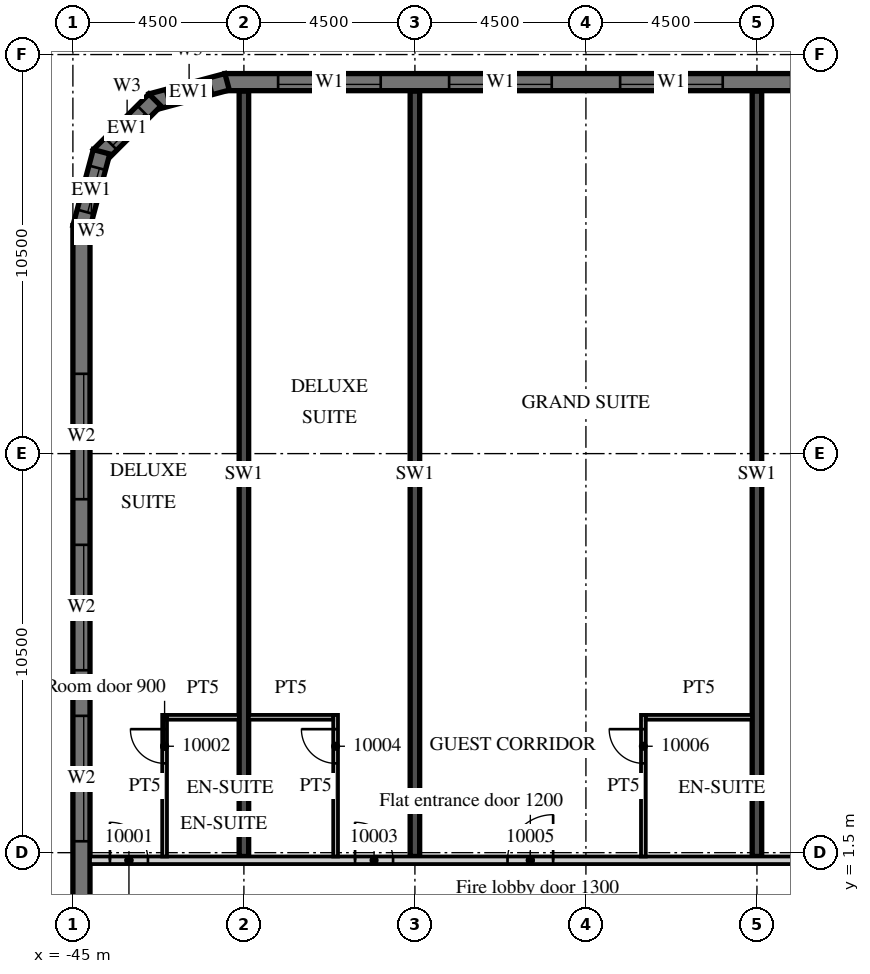
"""IFC4 building model, lengths in metres.
Left out: names, types, materials, properties, quantities, classifications, styles, units other than length and angle.
Written with IfcOpenShell. Run it as: python <this file> out.ifc"""

import sys

from ifc_helpers import new_model, si_unit, direction, frame, frame_2d, origin, place, context, subcontext, project, spatial, polyline, rectangle, outline, extrude, element, fill, save


model = new_model("IFC4")
c1 = context("Model", 3, precision=1e-05, world=origin(), true_north=direction((0.0, 1.0)))
c2 = subcontext(c1, "Body", "Model", "MODEL_VIEW")
j1 = project(units=[si_unit("LENGTHUNIT", "METRE"), si_unit("PLANEANGLEUNIT", "RADIAN")], contexts=[c1])
p1 = place(None, origin())
s1 = spatial("IfcSite", under=j1, at=p1, CompositionType="ELEMENT")
p2 = place(p1, origin())
s2 = spatial("IfcBuilding", under=s1, at=p2, CompositionType="ELEMENT")
p3 = place(p2, frame((0.0, 0.0, 63.3)))
s3 = spatial("IfcBuildingStorey", under=s2, at=p3, CompositionType="ELEMENT", Elevation=63.3)
for number, where, z_axis, x_axis in (
    (1, (-40.5, 1.4, 0.0), (0.0, 0.0, 1.0), (0.0, 1.0, 0.0)),
    (2, (-36.0, 1.4, 0.0), (0.0, 0.0, 1.0), (0.0, 1.0, 0.0)),
    (3, (-27.0, 1.4, 0.0), (0.0, 0.0, 1.0), (0.0, 1.0, 0.0)),
):
    element("IfcWall", number, at=place(p3, frame(where, z_axis=z_axis, x_axis=x_axis)), inside=s3, PredefinedType="SHEAR", context=c2, shape_type="SweptSolid", body=[
        extrude(rectangle(XDim=20.14, YDim=0.25, at=frame_2d((10.07, 0.0))), origin(), (0.0, 0.0, 1.0), 3.3),
    ])
p4 = place(p3, frame((13.5, 21.775, 0.0), z_axis=(0.0, 0.0, 1.0), x_axis=(-1.0, 0.0, 0.0)))
e4 = element("IfcWall", 4, at=p4, inside=s3, PredefinedType="SOLIDWALL", context=c2, shape_type="SweptSolid", body=[
    extrude(rectangle(XDim=54.5, YDim=0.45, at=frame_2d((27.25, 0.0))), origin(), (0.0, 0.0, 1.0), 3.02),
])
p5 = place(p4, frame((0.9, 0.0, 0.45)))
e5 = element("IfcOpeningElement", 5, at=p5, cuts=e4, PredefinedType="OPENING", context=c2, shape_type="SweptSolid", body=[
    extrude(rectangle(XDim=2.7, YDim=2.25, at=frame_2d((1.35, 1.125))), frame((0.0, 0.235, 0.0), z_axis=(0.0, -1.0, 0.0), x_axis=(1.0, 0.0, 0.0)), (0.0, 0.0, 1.0), 0.47),
])
p6 = place(p4, frame((5.4, 0.0, 0.45)))
e6 = element("IfcOpeningElement", 6, at=p6, cuts=e4, PredefinedType="OPENING", context=c2, shape_type="SweptSolid", body=[
    extrude(rectangle(XDim=2.7, YDim=2.25, at=frame_2d((1.35, 1.125))), frame((0.0, 0.235, 0.0), z_axis=(0.0, -1.0, 0.0), x_axis=(1.0, 0.0, 0.0)), (0.0, 0.0, 1.0), 0.47),
])
p7 = place(p4, frame((9.9, 0.0, 0.45)))
e7 = element("IfcOpeningElement", 7, at=p7, cuts=e4, PredefinedType="OPENING", context=c2, shape_type="SweptSolid", body=[
    extrude(rectangle(XDim=2.7, YDim=2.25, at=frame_2d((1.35, 1.125))), frame((0.0, 0.235, 0.0), z_axis=(0.0, -1.0, 0.0), x_axis=(1.0, 0.0, 0.0)), (0.0, 0.0, 1.0), 0.47),
])
p8 = place(p4, frame((14.4, 0.0, 0.45)))
e8 = element("IfcOpeningElement", 8, at=p8, cuts=e4, PredefinedType="OPENING", context=c2, shape_type="SweptSolid", body=[
    extrude(rectangle(XDim=2.7, YDim=2.25, at=frame_2d((1.35, 1.125))), frame((0.0, 0.235, 0.0), z_axis=(0.0, -1.0, 0.0), x_axis=(1.0, 0.0, 0.0)), (0.0, 0.0, 1.0), 0.47),
])
p9 = place(p4, frame((18.9, 0.0, 0.45)))
e9 = element("IfcOpeningElement", 9, at=p9, cuts=e4, PredefinedType="OPENING", context=c2, shape_type="SweptSolid", body=[
    extrude(rectangle(XDim=2.7, YDim=2.25, at=frame_2d((1.35, 1.125))), frame((0.0, 0.235, 0.0), z_axis=(0.0, -1.0, 0.0), x_axis=(1.0, 0.0, 0.0)), (0.0, 0.0, 1.0), 0.47),
])
p10 = place(p4, frame((23.4, 0.0, 0.45)))
e10 = element("IfcOpeningElement", 10, at=p10, cuts=e4, PredefinedType="OPENING", context=c2, shape_type="SweptSolid", body=[
    extrude(rectangle(XDim=2.7, YDim=2.25, at=frame_2d((1.35, 1.125))), frame((0.0, 0.235, 0.0), z_axis=(0.0, -1.0, 0.0), x_axis=(1.0, 0.0, 0.0)), (0.0, 0.0, 1.0), 0.47),
])
p11 = place(p4, frame((27.9, 0.0, 0.45)))
e11 = element("IfcOpeningElement", 11, at=p11, cuts=e4, PredefinedType="OPENING", context=c2, shape_type="SweptSolid", body=[
    extrude(rectangle(XDim=2.7, YDim=2.25, at=frame_2d((1.35, 1.125))), frame((0.0, 0.235, 0.0), z_axis=(0.0, -1.0, 0.0), x_axis=(1.0, 0.0, 0.0)), (0.0, 0.0, 1.0), 0.47),
])
p12 = place(p4, frame((32.4, 0.0, 0.45)))
e12 = element("IfcOpeningElement", 12, at=p12, cuts=e4, PredefinedType="OPENING", context=c2, shape_type="SweptSolid", body=[
    extrude(rectangle(XDim=2.7, YDim=2.25, at=frame_2d((1.35, 1.125))), frame((0.0, 0.235, 0.0), z_axis=(0.0, -1.0, 0.0), x_axis=(1.0, 0.0, 0.0)), (0.0, 0.0, 1.0), 0.47),
])
p13 = place(p4, frame((36.9, 0.0, 0.45)))
e13 = element("IfcOpeningElement", 13, at=p13, cuts=e4, PredefinedType="OPENING", context=c2, shape_type="SweptSolid", body=[
    extrude(rectangle(XDim=2.7, YDim=2.25, at=frame_2d((1.35, 1.125))), frame((0.0, 0.235, 0.0), z_axis=(0.0, -1.0, 0.0), x_axis=(1.0, 0.0, 0.0)), (0.0, 0.0, 1.0), 0.47),
])
p14 = place(p4, frame((41.4, 0.0, 0.45)))
e14 = element("IfcOpeningElement", 14, at=p14, cuts=e4, PredefinedType="OPENING", context=c2, shape_type="SweptSolid", body=[
    extrude(rectangle(XDim=2.7, YDim=2.25, at=frame_2d((1.35, 1.125))), frame((0.0, 0.235, 0.0), z_axis=(0.0, -1.0, 0.0), x_axis=(1.0, 0.0, 0.0)), (0.0, 0.0, 1.0), 0.47),
])
p15 = place(p4, frame((45.9, 0.0, 0.45)))
e15 = element("IfcOpeningElement", 15, at=p15, cuts=e4, PredefinedType="OPENING", context=c2, shape_type="SweptSolid", body=[
    extrude(rectangle(XDim=2.7, YDim=2.25, at=frame_2d((1.35, 1.125))), frame((0.0, 0.235, 0.0), z_axis=(0.0, -1.0, 0.0), x_axis=(1.0, 0.0, 0.0)), (0.0, 0.0, 1.0), 0.47),
])
p16 = place(p4, frame((50.4, 0.0, 0.45)))
e16 = element("IfcOpeningElement", 16, at=p16, cuts=e4, PredefinedType="OPENING", context=c2, shape_type="SweptSolid", body=[
    extrude(rectangle(XDim=2.7, YDim=2.25, at=frame_2d((1.35, 1.125))), frame((0.0, 0.235, 0.0), z_axis=(0.0, -1.0, 0.0), x_axis=(1.0, 0.0, 0.0)), (0.0, 0.0, 1.0), 0.47),
])
p17 = place(p3, frame((-40.942, 21.783, 0.0), z_axis=(0.0, 0.0, 1.0), x_axis=(-0.965926999034, -0.25881466832, 0.0)))
e17 = element("IfcWall", 17, at=p17, inside=s3, PredefinedType="SOLIDWALL", context=c2, shape_type="SweptSolid", body=[
    extrude(outline(polyline([(0.0, -0.225), (2.071, -0.225), (1.95, 0.225), (0.121, 0.225), (0.0, -0.225)])), origin(), (0.0, 0.0, 1.0), 3.02),
])
p18 = place(p17, frame((0.435, 0.0, 0.45)))
e18 = element("IfcOpeningElement", 18, at=p18, cuts=e17, PredefinedType="OPENING", context=c2, shape_type="SweptSolid", body=[
    extrude(rectangle(XDim=1.2, YDim=2.25, at=frame_2d((0.6, 1.125))), frame((0.0, 0.235, 0.0), z_axis=(0.0, -1.0, 0.0), x_axis=(1.0, 0.0, 0.0)), (0.0, 0.0, 1.0), 0.47),
])
p19 = place(p3, frame((-42.841, 21.305, 0.0), z_axis=(0.0, 0.0, 1.0), x_axis=(-0.707106781187, -0.707106781187, 0.0)))
e19 = element("IfcWall", 19, at=p19, inside=s3, PredefinedType="SOLIDWALL", context=c2, shape_type="SweptSolid", body=[
    extrude(outline(polyline([(0.0, -0.225), (2.071, -0.225), (1.95, 0.225), (0.121, 0.225), (0.0, -0.225)])), origin(), (0.0, 0.0, 1.0), 3.02),
])
p20 = place(p19, frame((0.435, 0.0, 0.45)))
e20 = element("IfcOpeningElement", 20, at=p20, cuts=e19, PredefinedType="OPENING", context=c2, shape_type="SweptSolid", body=[
    extrude(rectangle(XDim=1.2, YDim=2.25, at=frame_2d((0.6, 1.125))), frame((0.0, 0.235, 0.0), z_axis=(0.0, -1.0, 0.0), x_axis=(1.0, 0.0, 0.0)), (0.0, 0.0, 1.0), 0.47),
])
p21 = place(p3, frame((-44.247, 19.942, 0.0), z_axis=(0.0, 0.0, 1.0), x_axis=(-0.25881466832, -0.965926999034, 0.0)))
e21 = element("IfcWall", 21, at=p21, inside=s3, PredefinedType="SOLIDWALL", context=c2, shape_type="SweptSolid", body=[
    extrude(outline(polyline([(-0.0, -0.225), (2.07, -0.225), (1.95, 0.225), (0.12, 0.225), (-0.0, -0.225)])), origin(), (0.0, 0.0, 1.0), 3.02),
])
p22 = place(p21, frame((0.435, 0.0, 0.45)))
e22 = element("IfcOpeningElement", 22, at=p22, cuts=e21, PredefinedType="OPENING", context=c2, shape_type="SweptSolid", body=[
    extrude(rectangle(XDim=1.2, YDim=2.25, at=frame_2d((0.6, 1.125))), frame((0.0, 0.235, 0.0), z_axis=(0.0, -1.0, 0.0), x_axis=(1.0, 0.0, 0.0)), (0.0, 0.0, 1.0), 0.47),
])
p23 = place(p3, frame((-44.775, 18.0, 0.0), z_axis=(0.0, 0.0, 1.0), x_axis=(0.0, -1.0, 0.0)))
e23 = element("IfcWall", 23, at=p23, inside=s3, PredefinedType="SOLIDWALL", context=c2, shape_type="SweptSolid", body=[
    extrude(rectangle(XDim=36.0, YDim=0.45, at=frame_2d((18.0, 0.0))), origin(), (0.0, 0.0, 1.0), 3.02),
])
p24 = place(p23, frame((3.9, 0.0, 0.45)))
e24 = element("IfcOpeningElement", 24, at=p24, cuts=e23, PredefinedType="OPENING", context=c2, shape_type="SweptSolid", body=[
    extrude(rectangle(XDim=3.3, YDim=2.25, at=frame_2d((1.65, 1.125))), frame((0.0, 0.235, 0.0), z_axis=(0.0, -1.0, 0.0), x_axis=(1.0, 0.0, 0.0)), (0.0, 0.0, 1.0), 0.47),
])
p25 = place(p23, frame((8.4, 0.0, 0.45)))
e25 = element("IfcOpeningElement", 25, at=p25, cuts=e23, PredefinedType="OPENING", context=c2, shape_type="SweptSolid", body=[
    extrude(rectangle(XDim=3.3, YDim=2.25, at=frame_2d((1.65, 1.125))), frame((0.0, 0.235, 0.0), z_axis=(0.0, -1.0, 0.0), x_axis=(1.0, 0.0, 0.0)), (0.0, 0.0, 1.0), 0.47),
])
p26 = place(p23, frame((12.9, 0.0, 0.45)))
e26 = element("IfcOpeningElement", 26, at=p26, cuts=e23, PredefinedType="OPENING", context=c2, shape_type="SweptSolid", body=[
    extrude(rectangle(XDim=3.3, YDim=2.25, at=frame_2d((1.65, 1.125))), frame((0.0, 0.235, 0.0), z_axis=(0.0, -1.0, 0.0), x_axis=(1.0, 0.0, 0.0)), (0.0, 0.0, 1.0), 0.47),
])
p27 = place(p3, frame((-44.55, 1.3, 0.0), z_axis=(0.0, 0.0, 1.0), x_axis=(1.0, 0.0, 0.0)))
e27 = element("IfcWall", 27, at=p27, inside=s3, PredefinedType="PARTITIONING", context=c2, shape_type="SweptSolid", body=[
    extrude(rectangle(XDim=58.05, YDim=0.2, at=frame_2d((29.025, 0.0))), origin(), (0.0, 0.0, 1.0), 3.02),
])
p28 = place(p27, frame((0.525, 0.0, 0.0)))
e28 = element("IfcOpeningElement", 28, at=p28, cuts=e27, PredefinedType="OPENING", context=c2, shape_type="SweptSolid", body=[
    extrude(rectangle(XDim=1.0, YDim=2.1, at=frame_2d((0.5, 1.05))), frame((0.0, 0.11, 0.0), z_axis=(0.0, -1.0, 0.0), x_axis=(1.0, 0.0, 0.0)), (0.0, 0.0, 1.0), 0.22),
])
p29 = place(p27, frame((6.975, 0.0, 0.0)))
e29 = element("IfcOpeningElement", 29, at=p29, cuts=e27, PredefinedType="OPENING", context=c2, shape_type="SweptSolid", body=[
    extrude(rectangle(XDim=1.0, YDim=2.1, at=frame_2d((0.5, 1.05))), frame((0.0, 0.11, 0.0), z_axis=(0.0, -1.0, 0.0), x_axis=(1.0, 0.0, 0.0)), (0.0, 0.0, 1.0), 0.22),
])
p30 = place(p27, frame((10.987, 0.0, 0.0)))
e30 = element("IfcOpeningElement", 30, at=p30, cuts=e27, PredefinedType="OPENING", context=c2, shape_type="SweptSolid", body=[
    extrude(rectangle(XDim=1.2, YDim=2.1, at=frame_2d((0.6, 1.05))), frame((0.0, 0.11, 0.0), z_axis=(0.0, -1.0, 0.0), x_axis=(1.0, 0.0, 0.0)), (0.0, 0.0, 1.0), 0.22),
])
p31 = place(p27, frame((19.987, 0.0, 0.0)))
e31 = element("IfcOpeningElement", 31, at=p31, cuts=e27, PredefinedType="OPENING", context=c2, shape_type="SweptSolid", body=[
    extrude(rectangle(XDim=1.2, YDim=2.1, at=frame_2d((0.6, 1.05))), frame((0.0, 0.11, 0.0), z_axis=(0.0, -1.0, 0.0), x_axis=(1.0, 0.0, 0.0)), (0.0, 0.0, 1.0), 0.22),
])
p32 = place(p27, frame((29.5, 0.0, 0.0)))
e32 = element("IfcOpeningElement", 32, at=p32, cuts=e27, PredefinedType="OPENING", context=c2, shape_type="SweptSolid", body=[
    extrude(rectangle(XDim=1.0, YDim=2.1, at=frame_2d((0.5, 1.05))), frame((0.0, 0.11, 0.0), z_axis=(0.0, -1.0, 0.0), x_axis=(1.0, 0.0, 0.0)), (0.0, 0.0, 1.0), 0.22),
])
p33 = place(p27, frame((33.975, 0.0, 0.0)))
e33 = element("IfcOpeningElement", 33, at=p33, cuts=e27, PredefinedType="OPENING", context=c2, shape_type="SweptSolid", body=[
    extrude(rectangle(XDim=1.0, YDim=2.1, at=frame_2d((0.5, 1.05))), frame((0.0, 0.11, 0.0), z_axis=(0.0, -1.0, 0.0), x_axis=(1.0, 0.0, 0.0)), (0.0, 0.0, 1.0), 0.22),
])
p34 = place(p27, frame((40.912, 0.0, 0.0)))
e34 = element("IfcOpeningElement", 34, at=p34, cuts=e27, PredefinedType="OPENING", context=c2, shape_type="SweptSolid", body=[
    extrude(rectangle(XDim=1.2, YDim=2.1, at=frame_2d((0.6, 1.05))), frame((0.0, 0.11, 0.0), z_axis=(0.0, -1.0, 0.0), x_axis=(1.0, 0.0, 0.0)), (0.0, 0.0, 1.0), 0.22),
])
p35 = place(p27, frame((47.5, 0.0, 0.0)))
e35 = element("IfcOpeningElement", 35, at=p35, cuts=e27, PredefinedType="OPENING", context=c2, shape_type="SweptSolid", body=[
    extrude(rectangle(XDim=1.0, YDim=2.1, at=frame_2d((0.5, 1.05))), frame((0.0, 0.11, 0.0), z_axis=(0.0, -1.0, 0.0), x_axis=(1.0, 0.0, 0.0)), (0.0, 0.0, 1.0), 0.22),
])
p36 = place(p27, frame((51.975, 0.0, 0.0)))
e36 = element("IfcOpeningElement", 36, at=p36, cuts=e27, PredefinedType="OPENING", context=c2, shape_type="SweptSolid", body=[
    extrude(rectangle(XDim=1.0, YDim=2.1, at=frame_2d((0.5, 1.05))), frame((0.0, 0.11, 0.0), z_axis=(0.0, -1.0, 0.0), x_axis=(1.0, 0.0, 0.0)), (0.0, 0.0, 1.0), 0.22),
])
p37 = place(p27, frame((56.475, 0.0, 0.0)))
e37 = element("IfcOpeningElement", 37, at=p37, cuts=e27, PredefinedType="OPENING", context=c2, shape_type="SweptSolid", body=[
    extrude(rectangle(XDim=1.0, YDim=2.1, at=frame_2d((0.5, 1.05))), frame((0.0, 0.11, 0.0), z_axis=(0.0, -1.0, 0.0), x_axis=(1.0, 0.0, 0.0)), (0.0, 0.0, 1.0), 0.22),
])
p38 = place(p3, frame((-42.587, 1.4, 0.0), z_axis=(0.0, 0.0, 1.0), x_axis=(0.0, 1.0, 0.0)))
e38 = element("IfcWall", 38, at=p38, inside=s3, PredefinedType="PARTITIONING", context=c2, shape_type="SweptSolid", body=[
    extrude(rectangle(XDim=3.725, YDim=0.125, at=frame_2d((1.863, 0.0))), origin(), (0.0, 0.0, 1.0), 3.02),
])
p39 = place(p38, frame((2.45, 0.0, 0.0)))
e39 = element("IfcOpeningElement", 39, at=p39, cuts=e38, PredefinedType="OPENING", context=c2, shape_type="SweptSolid", body=[
    extrude(rectangle(XDim=0.9, YDim=2.1, at=frame_2d((0.45, 1.05))), frame((0.0, 0.073, 0.0), z_axis=(0.0, -1.0, 0.0), x_axis=(1.0, 0.0, 0.0)), (0.0, 0.0, 1.0), 0.145),
])
p40 = place(p3, frame((-42.525, 5.062, 0.0), z_axis=(0.0, 0.0, 1.0), x_axis=(1.0, 0.0, 0.0)))
e40 = element("IfcWall", 40, at=p40, inside=s3, PredefinedType="PARTITIONING", context=c2, shape_type="SweptSolid", body=[
    extrude(rectangle(XDim=1.9, YDim=0.125, at=frame_2d((0.95, 0.0))), origin(), (0.0, 0.0, 1.0), 3.02),
])
p41 = place(p3, frame((-38.087, 1.4, 0.0), z_axis=(0.0, 0.0, 1.0), x_axis=(0.0, 1.0, 0.0)))
e41 = element("IfcWall", 41, at=p41, inside=s3, PredefinedType="PARTITIONING", context=c2, shape_type="SweptSolid", body=[
    extrude(rectangle(XDim=3.725, YDim=0.125, at=frame_2d((1.863, 0.0))), origin(), (0.0, 0.0, 1.0), 3.02),
])
p42 = place(p41, frame((2.45, 0.0, 0.0)))
e42 = element("IfcOpeningElement", 42, at=p42, cuts=e41, PredefinedType="OPENING", context=c2, shape_type="SweptSolid", body=[
    extrude(rectangle(XDim=0.9, YDim=2.1, at=frame_2d((0.45, 1.05))), frame((0.0, 0.073, 0.0), z_axis=(0.0, -1.0, 0.0), x_axis=(1.0, 0.0, 0.0)), (0.0, 0.0, 1.0), 0.145),
])
p43 = place(p3, frame((-40.375, 5.062, 0.0), z_axis=(0.0, 0.0, 1.0), x_axis=(1.0, 0.0, 0.0)))
e43 = element("IfcWall", 43, at=p43, inside=s3, PredefinedType="PARTITIONING", context=c2, shape_type="SweptSolid", body=[
    extrude(rectangle(XDim=2.225, YDim=0.125, at=frame_2d((1.113, 0.0))), origin(), (0.0, 0.0, 1.0), 3.02),
])
p44 = place(p3, frame((-29.988, 1.4, 0.0), z_axis=(0.0, 0.0, 1.0), x_axis=(0.0, 1.0, 0.0)))
e44 = element("IfcWall", 44, at=p44, inside=s3, PredefinedType="PARTITIONING", context=c2, shape_type="SweptSolid", body=[
    extrude(rectangle(XDim=3.725, YDim=0.125, at=frame_2d((1.863, 0.0))), origin(), (0.0, 0.0, 1.0), 3.02),
])
p45 = place(p44, frame((2.45, 0.0, 0.0)))
e45 = element("IfcOpeningElement", 45, at=p45, cuts=e44, PredefinedType="OPENING", context=c2, shape_type="SweptSolid", body=[
    extrude(rectangle(XDim=0.9, YDim=2.1, at=frame_2d((0.45, 1.05))), frame((0.0, 0.073, 0.0), z_axis=(0.0, -1.0, 0.0), x_axis=(1.0, 0.0, 0.0)), (0.0, 0.0, 1.0), 0.145),
])
p46 = place(p3, frame((-29.925, 5.062, 0.0), z_axis=(0.0, 0.0, 1.0), x_axis=(1.0, 0.0, 0.0)))
e46 = element("IfcWall", 46, at=p46, inside=s3, PredefinedType="PARTITIONING", context=c2, shape_type="SweptSolid", body=[
    extrude(rectangle(XDim=2.8, YDim=0.125, at=frame_2d((1.4, 0.0))), origin(), (0.0, 0.0, 1.0), 3.02),
])
p47 = place(p14, origin())
e47 = element("IfcWindow", 47, at=p47, inside=s3, PartitioningType="SINGLE_PANEL", PredefinedType="WINDOW", context=c2, shape_type="SweptSolid", body=[
    extrude(rectangle(XDim=2.7, YDim=2.25, at=frame_2d((1.35, 1.125))), frame((0.0, 0.09, 0.0), z_axis=(0.0, -1.0, 0.0), x_axis=(1.0, 0.0, 0.0)), (0.0, 0.0, 1.0), 0.06),
])
fill(e14, e47)
p48 = place(p15, origin())
e48 = element("IfcWindow", 48, at=p48, inside=s3, PartitioningType="SINGLE_PANEL", PredefinedType="WINDOW", context=c2, shape_type="SweptSolid", body=[
    extrude(rectangle(XDim=2.7, YDim=2.25, at=frame_2d((1.35, 1.125))), frame((0.0, 0.09, 0.0), z_axis=(0.0, -1.0, 0.0), x_axis=(1.0, 0.0, 0.0)), (0.0, 0.0, 1.0), 0.06),
])
fill(e15, e48)
p49 = place(p16, origin())
e49 = element("IfcWindow", 49, at=p49, inside=s3, PartitioningType="SINGLE_PANEL", PredefinedType="WINDOW", context=c2, shape_type="SweptSolid", body=[
    extrude(rectangle(XDim=2.7, YDim=2.25, at=frame_2d((1.35, 1.125))), frame((0.0, 0.09, 0.0), z_axis=(0.0, -1.0, 0.0), x_axis=(1.0, 0.0, 0.0)), (0.0, 0.0, 1.0), 0.06),
])
fill(e16, e49)
p50 = place(p18, origin())
e50 = element("IfcWindow", 50, at=p50, inside=s3, PartitioningType="SINGLE_PANEL", PredefinedType="WINDOW", context=c2, shape_type="SweptSolid", body=[
    extrude(rectangle(XDim=1.2, YDim=2.25, at=frame_2d((0.6, 1.125))), frame((0.0, 0.09, 0.0), z_axis=(0.0, -1.0, 0.0), x_axis=(1.0, 0.0, 0.0)), (0.0, 0.0, 1.0), 0.06),
])
fill(e18, e50)
p51 = place(p20, origin())
e51 = element("IfcWindow", 51, at=p51, inside=s3, PartitioningType="SINGLE_PANEL", PredefinedType="WINDOW", context=c2, shape_type="SweptSolid", body=[
    extrude(rectangle(XDim=1.2, YDim=2.25, at=frame_2d((0.6, 1.125))), frame((0.0, 0.09, 0.0), z_axis=(0.0, -1.0, 0.0), x_axis=(1.0, 0.0, 0.0)), (0.0, 0.0, 1.0), 0.06),
])
fill(e20, e51)
p52 = place(p22, origin())
e52 = element("IfcWindow", 52, at=p52, inside=s3, PartitioningType="SINGLE_PANEL", PredefinedType="WINDOW", context=c2, shape_type="SweptSolid", body=[
    extrude(rectangle(XDim=1.2, YDim=2.25, at=frame_2d((0.6, 1.125))), frame((0.0, 0.09, 0.0), z_axis=(0.0, -1.0, 0.0), x_axis=(1.0, 0.0, 0.0)), (0.0, 0.0, 1.0), 0.06),
])
fill(e22, e52)
p53 = place(p24, origin())
e53 = element("IfcWindow", 53, at=p53, inside=s3, PartitioningType="SINGLE_PANEL", PredefinedType="WINDOW", context=c2, shape_type="SweptSolid", body=[
    extrude(rectangle(XDim=3.3, YDim=2.25, at=frame_2d((1.65, 1.125))), frame((0.0, 0.09, 0.0), z_axis=(0.0, -1.0, 0.0), x_axis=(1.0, 0.0, 0.0)), (0.0, 0.0, 1.0), 0.06),
])
fill(e24, e53)
p54 = place(p25, origin())
e54 = element("IfcWindow", 54, at=p54, inside=s3, PartitioningType="SINGLE_PANEL", PredefinedType="WINDOW", context=c2, shape_type="SweptSolid", body=[
    extrude(rectangle(XDim=3.3, YDim=2.25, at=frame_2d((1.65, 1.125))), frame((0.0, 0.09, 0.0), z_axis=(0.0, -1.0, 0.0), x_axis=(1.0, 0.0, 0.0)), (0.0, 0.0, 1.0), 0.06),
])
fill(e25, e54)
p55 = place(p26, origin())
e55 = element("IfcWindow", 55, at=p55, inside=s3, PartitioningType="SINGLE_PANEL", PredefinedType="WINDOW", context=c2, shape_type="SweptSolid", body=[
    extrude(rectangle(XDim=3.3, YDim=2.25, at=frame_2d((1.65, 1.125))), frame((0.0, 0.09, 0.0), z_axis=(0.0, -1.0, 0.0), x_axis=(1.0, 0.0, 0.0)), (0.0, 0.0, 1.0), 0.06),
])
fill(e26, e55)
p56 = place(p28, origin())
e56 = element("IfcDoor", 56, at=p56, inside=s3, OperationType="SINGLE_SWING_LEFT", PredefinedType="DOOR", context=c2, shape_type="SweptSolid", body=[
    extrude(rectangle(XDim=1.0, YDim=2.1, at=frame_2d((0.5, 1.05))), frame((0.0, 0.025, 0.0), z_axis=(0.0, -1.0, 0.0), x_axis=(1.0, 0.0, 0.0)), (0.0, 0.0, 1.0), 0.05),
])
fill(e28, e56)
p57 = place(p39, origin())
e57 = element("IfcDoor", 57, at=p57, inside=s3, OperationType="SINGLE_SWING_RIGHT", PredefinedType="DOOR", context=c2, shape_type="SweptSolid", body=[
    extrude(rectangle(XDim=0.9, YDim=2.1, at=frame_2d((0.45, 1.05))), frame((0.0, 0.025, 0.0), z_axis=(0.0, -1.0, 0.0), x_axis=(1.0, 0.0, 0.0)), (0.0, 0.0, 1.0), 0.05),
])
fill(e39, e57)
p58 = place(p29, origin())
e58 = element("IfcDoor", 58, at=p58, inside=s3, OperationType="SINGLE_SWING_LEFT", PredefinedType="DOOR", context=c2, shape_type="SweptSolid", body=[
    extrude(rectangle(XDim=1.0, YDim=2.1, at=frame_2d((0.5, 1.05))), frame((0.0, 0.025, 0.0), z_axis=(0.0, -1.0, 0.0), x_axis=(1.0, 0.0, 0.0)), (0.0, 0.0, 1.0), 0.05),
])
fill(e29, e58)
p59 = place(p42, origin())
e59 = element("IfcDoor", 59, at=p59, inside=s3, OperationType="SINGLE_SWING_RIGHT", PredefinedType="DOOR", context=c2, shape_type="SweptSolid", body=[
    extrude(rectangle(XDim=0.9, YDim=2.1, at=frame_2d((0.45, 1.05))), frame((0.0, 0.025, 0.0), z_axis=(0.0, -1.0, 0.0), x_axis=(1.0, 0.0, 0.0)), (0.0, 0.0, 1.0), 0.05),
])
fill(e42, e59)
p60 = place(p30, origin())
e60 = element("IfcDoor", 60, at=p60, inside=s3, OperationType="SINGLE_SWING_RIGHT", PredefinedType="DOOR", context=c2, shape_type="SweptSolid", body=[
    extrude(rectangle(XDim=1.2, YDim=2.1, at=frame_2d((0.6, 1.05))), frame((0.0, 0.025, 0.0), z_axis=(0.0, -1.0, 0.0), x_axis=(1.0, 0.0, 0.0)), (0.0, 0.0, 1.0), 0.05),
])
fill(e30, e60)
p61 = place(p45, origin())
e61 = element("IfcDoor", 61, at=p61, inside=s3, OperationType="SINGLE_SWING_RIGHT", PredefinedType="DOOR", context=c2, shape_type="SweptSolid", body=[
    extrude(rectangle(XDim=0.9, YDim=2.1, at=frame_2d((0.45, 1.05))), frame((0.0, 0.025, 0.0), z_axis=(0.0, -1.0, 0.0), x_axis=(1.0, 0.0, 0.0)), (0.0, 0.0, 1.0), 0.05),
])
fill(e45, e61)
save(model, sys.argv[1])
